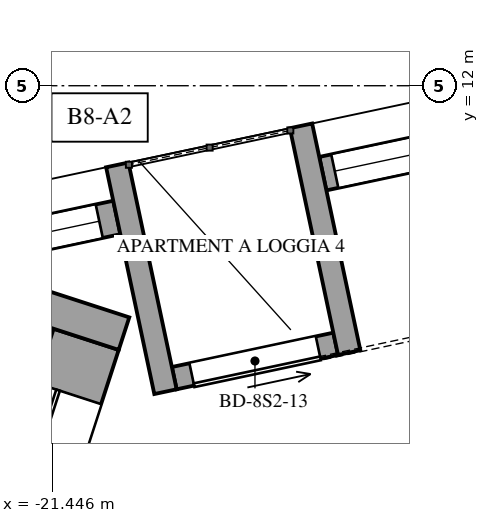
"""IFC4 building model, lengths in metres.
Left out: names, types, materials, properties, quantities, classifications, styles, units other than length and angle.
Written with IfcOpenShell. Run it as: python <this file> out.ifc"""

import sys

from ifc_helpers import new_model, si_unit, direction, frame, frame_2d, origin, place, context, subcontext, project, spatial, rectangle, extrude, element, fill, save


model = new_model("IFC4")
c1 = context("Model", 3, precision=1e-05, world=origin(), true_north=direction((0.0, 1.0)))
c2 = subcontext(c1, "Body", "Model", "MODEL_VIEW")
j1 = project(units=[si_unit("LENGTHUNIT", "METRE"), si_unit("PLANEANGLEUNIT", "RADIAN")], contexts=[c1])
p1 = place(None, origin())
s1 = spatial("IfcSite", under=j1, at=p1, CompositionType="ELEMENT")
p2 = place(p1, origin())
s2 = spatial("IfcBuilding", under=s1, at=p2, CompositionType="ELEMENT")
p3 = place(p2, frame((0.0, 0.0, 320.4)))
s3 = spatial("IfcBuildingStorey", under=s2, at=p3, CompositionType="ELEMENT", Elevation=320.4)
p4 = place(p3, frame((-15.666, 11.315, 0.0), z_axis=(0.0, 0.0, 1.0), x_axis=(-0.978148740936, -0.207906326516, 0.0)))
e1 = element("IfcWall", 1, at=p4, inside=s3, PredefinedType="SOLIDWALL", context=c2, shape_type="SweptSolid", body=[
    extrude(rectangle(XDim=2.271, YDim=0.45, at=frame_2d((1.135, 0.0))), origin(), (0.0, 0.0, 1.0), 3.3),
])
p5 = place(p4, frame((0.161, 0.0, 0.4)))
e2 = element("IfcOpeningElement", 2, at=p5, cuts=e1, PredefinedType="OPENING", context=c2, shape_type="SweptSolid", body=[
    extrude(rectangle(XDim=1.95, YDim=2.75, at=frame_2d((0.975, 1.375))), frame((0.0, 0.235, 0.0), z_axis=(0.0, -1.0, 0.0), x_axis=(1.0, 0.0, 0.0)), (0.0, 0.0, 1.0), 0.47),
])
p6 = place(p3, frame((-20.598, 10.267, 0.0), z_axis=(0.0, 0.0, 1.0), x_axis=(-0.978126168783, -0.208012494676, 0.0)))
e3 = element("IfcWall", 3, at=p6, inside=s3, PredefinedType="SOLIDWALL", context=c2, shape_type="SweptSolid", body=[
    extrude(rectangle(XDim=1.671, YDim=0.45, at=frame_2d((0.836, 0.0))), origin(), (0.0, 0.0, 1.0), 3.3),
])
p7 = place(p6, frame((0.236, 0.0, 0.4)))
e4 = element("IfcOpeningElement", 4, at=p7, cuts=e3, PredefinedType="OPENING", context=c2, shape_type="SweptSolid", body=[
    extrude(rectangle(XDim=1.2, YDim=2.1, at=frame_2d((0.6, 1.05))), frame((0.0, 0.235, 0.0), z_axis=(0.0, -1.0, 0.0), x_axis=(1.0, 0.0, 0.0)), (0.0, 0.0, 1.0), 0.47),
])
p8 = place(p3, frame((-17.718, 8.604, 0.0), z_axis=(0.0, 0.0, 1.0), x_axis=(-0.978148276005, -0.207908513891, 0.0)))
e5 = element("IfcWall", 5, at=p8, inside=s3, PredefinedType="SOLIDWALL", context=c2, shape_type="SweptSolid", body=[
    extrude(rectangle(XDim=2.171, YDim=0.3, at=frame_2d((1.085, 0.0))), origin(), (0.0, 0.0, 1.0), 3.3),
])
p9 = place(p8, frame((0.236, 0.0, 0.0)))
e6 = element("IfcOpeningElement", 6, at=p9, cuts=e5, PredefinedType="OPENING", context=c2, shape_type="SweptSolid", body=[
    extrude(rectangle(XDim=1.7, YDim=2.5, at=frame_2d((0.85, 1.25))), frame((0.0, 0.16, 0.0), z_axis=(0.0, -1.0, 0.0), x_axis=(1.0, 0.0, 0.0)), (0.0, 0.0, 1.0), 0.32),
])
p10 = place(p3, frame((-18.174, 11.472, 0.0), z_axis=(0.0, 0.0, 1.0), x_axis=(0.207894179953, -0.978151322619, 0.0)))
e7 = element("IfcWall", 7, at=p10, inside=s3, PredefinedType="SOLIDWALL", context=c2, shape_type="SweptSolid", body=[
    extrude(rectangle(XDim=3.05, YDim=0.3, at=frame_2d((1.525, 0.0))), origin(), (0.0, 0.0, 1.0), 3.3),
])
p11 = place(p3, frame((-20.592, 10.958, 0.0), z_axis=(0.0, 0.0, 1.0), x_axis=(0.207877902534, -0.978154782045, 0.0)))
e8 = element("IfcWall", 8, at=p11, inside=s3, PredefinedType="SOLIDWALL", context=c2, shape_type="SweptSolid", body=[
    extrude(rectangle(XDim=3.05, YDim=0.3, at=frame_2d((1.525, 0.0))), origin(), (0.0, 0.0, 1.0), 3.3),
])
p12 = place(p3, frame((-22.082, 5.335, 0.0), z_axis=(0.0, 0.0, 1.0), x_axis=(0.309019824916, 0.951055596592, 0.0)))
e9 = element("IfcWall", 9, at=p12, inside=s3, PredefinedType="SOLIDWALL", context=c2, shape_type="SweptSolid", body=[
    extrude(rectangle(XDim=3.5, YDim=0.9, at=frame_2d((1.75, 0.0))), origin(), (0.0, 0.0, 1.0), 3.3),
])
p13 = place(p12, frame((0.75, 0.0, 0.0)))
e10 = element("IfcOpeningElement", 10, at=p13, cuts=e9, PredefinedType="OPENING", context=c2, shape_type="SweptSolid", body=[
    extrude(rectangle(XDim=2.0, YDim=2.4, at=frame_2d((1.0, 1.2))), frame((0.0, 0.46, 0.0), z_axis=(0.0, -1.0, 0.0), x_axis=(1.0, 0.0, 0.0)), (0.0, 0.0, 1.0), 0.92),
])
p14 = place(p3, frame((-22.576, 9.412, 0.0), z_axis=(0.0, 0.0, 1.0), x_axis=(0.951064526973, -0.308992338955, 0.0)))
e11 = element("IfcWall", 11, at=p14, inside=s3, PredefinedType="SOLIDWALL", context=c2, shape_type="SweptSolid", body=[
    extrude(rectangle(XDim=2.179, YDim=0.45, at=frame_2d((1.09, 0.0))), origin(), (0.0, 0.0, 1.0), 2.55),
])
p15 = place(p5, origin())
e12 = element("IfcWindow", 12, at=p15, inside=s3, PartitioningType="SINGLE_PANEL", PredefinedType="WINDOW", context=c2, shape_type="SweptSolid", body=[
    extrude(rectangle(XDim=1.95, YDim=2.75, at=frame_2d((0.975, 1.375))), frame((0.0, 0.03, 0.0), z_axis=(0.0, -1.0, 0.0), x_axis=(1.0, 0.0, 0.0)), (0.0, 0.0, 1.0), 0.06),
])
fill(e2, e12)
p16 = place(p7, origin())
e13 = element("IfcWindow", 13, at=p16, inside=s3, PartitioningType="SINGLE_PANEL", PredefinedType="WINDOW", context=c2, shape_type="SweptSolid", body=[
    extrude(rectangle(XDim=1.2, YDim=2.1, at=frame_2d((0.6, 1.05))), frame((0.0, 0.03, 0.0), z_axis=(0.0, -1.0, 0.0), x_axis=(1.0, 0.0, 0.0)), (0.0, 0.0, 1.0), 0.06),
])
fill(e4, e13)
p17 = place(p9, origin())
e14 = element("IfcDoor", 14, at=p17, inside=s3, OperationType="SLIDING_TO_LEFT", PredefinedType="DOOR", context=c2, shape_type="SweptSolid", body=[
    extrude(rectangle(XDim=1.7, YDim=2.5, at=frame_2d((0.85, 1.25))), frame((0.0, 0.025, 0.0), z_axis=(0.0, -1.0, 0.0), x_axis=(1.0, 0.0, 0.0)), (0.0, 0.0, 1.0), 0.05),
])
fill(e6, e14)
p18 = place(p13, origin())
e15 = element("IfcDoor", 15, at=p18, inside=s3, OperationType="SLIDING_TO_LEFT", PredefinedType="DOOR", context=c2, shape_type="SweptSolid", body=[
    extrude(rectangle(XDim=2.0, YDim=2.4, at=frame_2d((1.0, 1.2))), frame((0.0, 0.025, 0.0), z_axis=(0.0, -1.0, 0.0), x_axis=(1.0, 0.0, 0.0)), (0.0, 0.0, 1.0), 0.05),
])
fill(e10, e15)
save(model, sys.argv[1])
